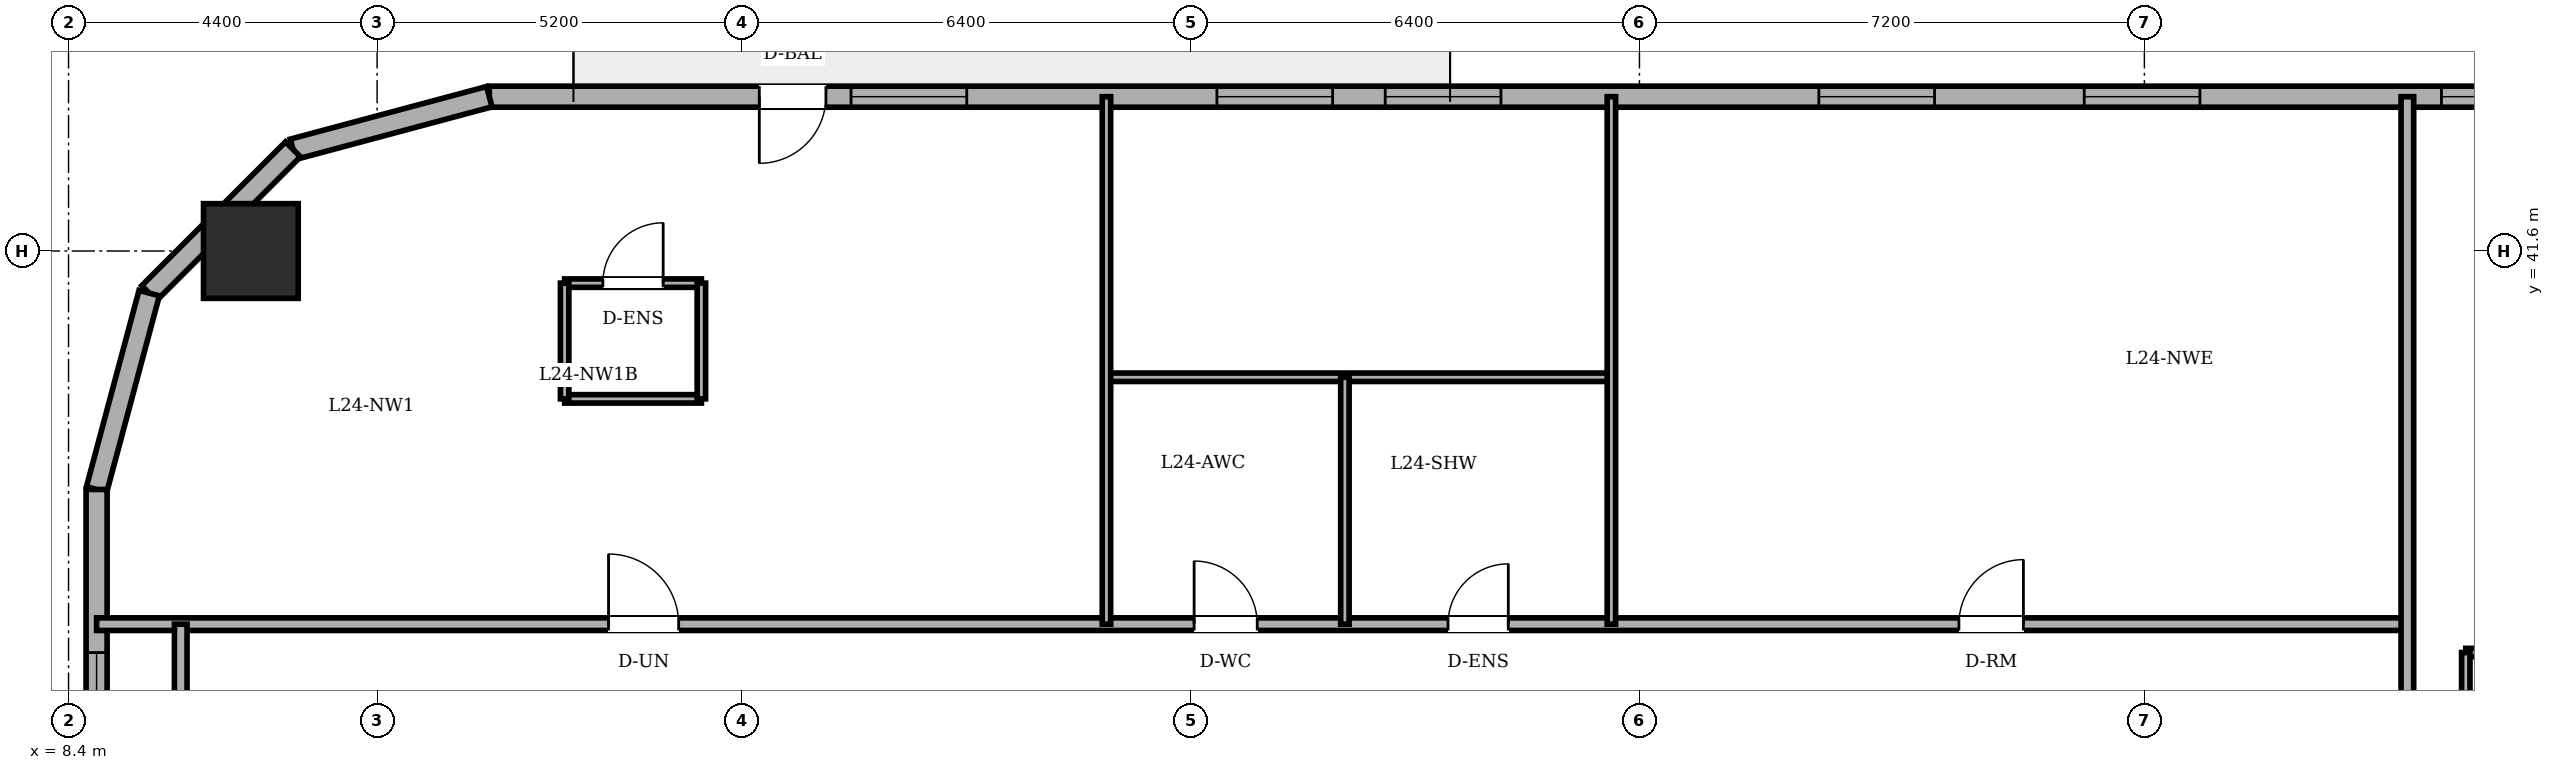
"""IFC4 building model, lengths in metres.
Left out: names, types, materials, properties, quantities, classifications, styles, units other than length and angle.
Written with IfcOpenShell. Run it as: python <this file> out.ifc"""

import sys

from ifc_helpers import new_model, si_unit, direction, frame, frame_2d, origin, origin_2d, place, context, subcontext, project, spatial, rectangle, circle, extrude, element, fill, save


model = new_model("IFC4")
c1 = context("Model", 3, precision=1e-05, world=origin(), true_north=direction((0.0, 1.0)))
c2 = subcontext(c1, "Body", "Model", "MODEL_VIEW")
j1 = project(units=[si_unit("LENGTHUNIT", "METRE"), si_unit("PLANEANGLEUNIT", "RADIAN")], contexts=[c1])
p1 = place(None, origin())
s1 = spatial("IfcSite", under=j1, at=p1, CompositionType="ELEMENT")
p2 = place(p1, origin())
s2 = spatial("IfcBuilding", under=s1, at=p2, CompositionType="ELEMENT")
p3 = place(p2, frame((0.0, 0.0, 93.5)))
s3 = spatial("IfcBuildingStorey", under=s2, at=p3, CompositionType="ELEMENT", Elevation=93.5)
p4 = place(p3, frame((11.0, 41.6, 0.0), z_axis=(0.0, 0.0, 1.0), x_axis=(1.0, 0.0, 0.0)))
e1 = element("IfcColumn", 1, at=p4, inside=s3, PredefinedType="COLUMN", context=c2, shape_type="SweptSolid", body=[
    extrude(circle(Radius=0.675, at=origin_2d()), origin(), (0.0, 0.0, 1.0), 3.6),
])
p5 = place(p3, frame((44.333, 43.8, 0.0), z_axis=(0.0, 0.0, 1.0), x_axis=(-1.0, 0.0, 0.0)))
e2 = element("IfcWall", 2, at=p5, inside=s3, PredefinedType="SOLIDWALL", context=c2, shape_type="SweptSolid", body=[
    extrude(rectangle(XDim=29.933, YDim=0.3, at=frame_2d((14.967, 0.0))), origin(), (0.0, 0.0, 1.0), 3.4),
])
p6 = place(p5, frame((25.133, 0.0, 0.0)))
e3 = element("IfcOpeningElement", 3, at=p6, cuts=e2, PredefinedType="OPENING", context=c2, shape_type="SweptSolid", body=[
    extrude(rectangle(XDim=0.95, YDim=2.2, at=frame_2d((0.475, 1.1))), frame((0.0, 0.16, 0.0), z_axis=(0.0, -1.0, 0.0), x_axis=(1.0, 0.0, 0.0)), (0.0, 0.0, 1.0), 0.32),
])
p7 = place(p5, frame((5.541, 0.0, 0.85)))
e4 = element("IfcOpeningElement", 4, at=p7, cuts=e2, PredefinedType="OPENING", context=c2, shape_type="SweptSolid", body=[
    extrude(rectangle(XDim=1.65, YDim=1.55, at=frame_2d((0.825, 0.775))), frame((0.0, 0.16, 0.0), z_axis=(0.0, -1.0, 0.0), x_axis=(1.0, 0.0, 0.0)), (0.0, 0.0, 1.0), 0.32),
])
p8 = place(p5, frame((9.325, 0.0, 0.85)))
e5 = element("IfcOpeningElement", 5, at=p8, cuts=e2, PredefinedType="OPENING", context=c2, shape_type="SweptSolid", body=[
    extrude(rectangle(XDim=1.65, YDim=1.55, at=frame_2d((0.825, 0.775))), frame((0.0, 0.16, 0.0), z_axis=(0.0, -1.0, 0.0), x_axis=(1.0, 0.0, 0.0)), (0.0, 0.0, 1.0), 0.32),
])
p9 = place(p5, frame((15.508, 0.0, 0.85)))
e6 = element("IfcOpeningElement", 6, at=p9, cuts=e2, PredefinedType="OPENING", context=c2, shape_type="SweptSolid", body=[
    extrude(rectangle(XDim=1.65, YDim=1.55, at=frame_2d((0.825, 0.775))), frame((0.0, 0.16, 0.0), z_axis=(0.0, -1.0, 0.0), x_axis=(1.0, 0.0, 0.0)), (0.0, 0.0, 1.0), 0.32),
])
p10 = place(p5, frame((17.908, 0.0, 0.85)))
e7 = element("IfcOpeningElement", 7, at=p10, cuts=e2, PredefinedType="OPENING", context=c2, shape_type="SweptSolid", body=[
    extrude(rectangle(XDim=1.65, YDim=1.55, at=frame_2d((0.825, 0.775))), frame((0.0, 0.16, 0.0), z_axis=(0.0, -1.0, 0.0), x_axis=(1.0, 0.0, 0.0)), (0.0, 0.0, 1.0), 0.32),
])
p11 = place(p5, frame((23.125, 0.0, 0.85)))
e8 = element("IfcOpeningElement", 8, at=p11, cuts=e2, PredefinedType="OPENING", context=c2, shape_type="SweptSolid", body=[
    extrude(rectangle(XDim=1.65, YDim=1.55, at=frame_2d((0.825, 0.775))), frame((0.0, 0.16, 0.0), z_axis=(0.0, -1.0, 0.0), x_axis=(1.0, 0.0, 0.0)), (0.0, 0.0, 1.0), 0.32),
])
p12 = place(p5, frame((1.047, 0.0, 0.85)))
e9 = element("IfcOpeningElement", 9, at=p12, cuts=e2, PredefinedType="OPENING", context=c2, shape_type="SweptSolid", body=[
    extrude(rectangle(XDim=1.05, YDim=1.55, at=frame_2d((0.525, 0.775))), frame((0.0, 0.16, 0.0), z_axis=(0.0, -1.0, 0.0), x_axis=(1.0, 0.0, 0.0)), (0.0, 0.0, 1.0), 0.32),
])
p13 = place(p3, frame((14.4, 43.8, 0.0), z_axis=(0.0, 0.0, 1.0), x_axis=(-0.965943540406, -0.258752926066, 0.0)))
e10 = element("IfcWall", 10, at=p13, inside=s3, PredefinedType="SOLIDWALL", context=c2, shape_type="SweptSolid", body=[
    extrude(rectangle(XDim=2.898, YDim=0.3, at=frame_2d((1.449, 0.0))), origin(), (0.0, 0.0, 1.0), 3.4),
])
p14 = place(p3, frame((11.6, 43.05, 0.0), z_axis=(0.0, 0.0, 1.0), x_axis=(-0.707106781187, -0.707106781187, 0.0)))
e11 = element("IfcWall", 11, at=p14, inside=s3, PredefinedType="SOLIDWALL", context=c2, shape_type="SweptSolid", body=[
    extrude(rectangle(XDim=2.899, YDim=0.3, at=frame_2d((1.45, 0.0))), origin(), (0.0, 0.0, 1.0), 3.4),
])
p15 = place(p3, frame((9.55, 41.0, 0.0), z_axis=(0.0, 0.0, 1.0), x_axis=(-0.258731875344, -0.96594917914, 0.0)))
e12 = element("IfcWall", 12, at=p15, inside=s3, PredefinedType="SOLIDWALL", context=c2, shape_type="SweptSolid", body=[
    extrude(rectangle(XDim=2.899, YDim=0.3, at=frame_2d((1.449, 0.0))), origin(), (0.0, 0.0, 1.0), 3.4),
])
p16 = place(p3, frame((8.8, 38.2, 0.0), z_axis=(0.0, 0.0, 1.0), x_axis=(0.0, -1.0, 0.0)))
e13 = element("IfcWall", 13, at=p16, inside=s3, PredefinedType="SOLIDWALL", context=c2, shape_type="SweptSolid", body=[
    extrude(rectangle(XDim=28.4, YDim=0.3, at=frame_2d((14.2, 0.0))), origin(), (0.0, 0.0, 1.0), 3.4),
])
p17 = place(p16, frame((2.325, 0.0, 0.85)))
e14 = element("IfcOpeningElement", 14, at=p17, cuts=e13, PredefinedType="OPENING", context=c2, shape_type="SweptSolid", body=[
    extrude(rectangle(XDim=1.65, YDim=1.55, at=frame_2d((0.825, 0.775))), frame((0.0, 0.16, 0.0), z_axis=(0.0, -1.0, 0.0), x_axis=(1.0, 0.0, 0.0)), (0.0, 0.0, 1.0), 0.32),
])
p18 = place(p16, frame((7.328, 0.0, 0.85)))
e15 = element("IfcOpeningElement", 15, at=p18, cuts=e13, PredefinedType="OPENING", context=c2, shape_type="SweptSolid", body=[
    extrude(rectangle(XDim=1.65, YDim=1.55, at=frame_2d((0.825, 0.775))), frame((0.0, 0.16, 0.0), z_axis=(0.0, -1.0, 0.0), x_axis=(1.0, 0.0, 0.0)), (0.0, 0.0, 1.0), 0.32),
])
p19 = place(p16, frame((11.102, 0.0, 0.85)))
e16 = element("IfcOpeningElement", 16, at=p19, cuts=e13, PredefinedType="OPENING", context=c2, shape_type="SweptSolid", body=[
    extrude(rectangle(XDim=1.65, YDim=1.55, at=frame_2d((0.825, 0.775))), frame((0.0, 0.16, 0.0), z_axis=(0.0, -1.0, 0.0), x_axis=(1.0, 0.0, 0.0)), (0.0, 0.0, 1.0), 0.32),
])
p20 = place(p16, frame((17.648, 0.0, 0.85)))
e17 = element("IfcOpeningElement", 17, at=p20, cuts=e13, PredefinedType="OPENING", context=c2, shape_type="SweptSolid", body=[
    extrude(rectangle(XDim=1.65, YDim=1.55, at=frame_2d((0.825, 0.775))), frame((0.0, 0.16, 0.0), z_axis=(0.0, -1.0, 0.0), x_axis=(1.0, 0.0, 0.0)), (0.0, 0.0, 1.0), 0.32),
])
p21 = place(p16, frame((20.422, 0.0, 0.85)))
e18 = element("IfcOpeningElement", 18, at=p21, cuts=e13, PredefinedType="OPENING", context=c2, shape_type="SweptSolid", body=[
    extrude(rectangle(XDim=1.65, YDim=1.55, at=frame_2d((0.825, 0.775))), frame((0.0, 0.16, 0.0), z_axis=(0.0, -1.0, 0.0), x_axis=(1.0, 0.0, 0.0)), (0.0, 0.0, 1.0), 0.32),
])
p22 = place(p16, frame((24.425, 0.0, 0.85)))
e19 = element("IfcOpeningElement", 19, at=p22, cuts=e13, PredefinedType="OPENING", context=c2, shape_type="SweptSolid", body=[
    extrude(rectangle(XDim=1.65, YDim=1.55, at=frame_2d((0.825, 0.775))), frame((0.0, 0.16, 0.0), z_axis=(0.0, -1.0, 0.0), x_axis=(1.0, 0.0, 0.0)), (0.0, 0.0, 1.0), 0.32),
])
p23 = place(p3, frame((42.583, 35.875, 0.0), z_axis=(0.0, 0.0, 1.0), x_axis=(1.0, 0.0, 0.0)))
e20 = element("IfcWall", 20, at=p23, inside=s3, PredefinedType="PARTITIONING", context=c2, shape_type="SweptSolid", body=[
    extrude(rectangle(XDim=1.95, YDim=0.12, at=frame_2d((0.975, 0.0))), origin(), (0.0, 0.0, 1.0), 3.4),
])
p24 = place(p23, frame((0.545, 0.0, 0.0)))
e21 = element("IfcOpeningElement", 21, at=p24, cuts=e20, PredefinedType="OPENING", context=c2, shape_type="SweptSolid", body=[
    extrude(rectangle(XDim=0.86, YDim=2.1, at=frame_2d((0.43, 1.05))), frame((0.0, 0.07, 0.0), z_axis=(0.0, -1.0, 0.0), x_axis=(1.0, 0.0, 0.0)), (0.0, 0.0, 1.0), 0.14),
])
p25 = place(p3, frame((42.583, 35.875, 0.0), z_axis=(0.0, 0.0, 1.0), x_axis=(0.0, -1.0, 0.0)))
e22 = element("IfcWall", 22, at=p25, inside=s3, PredefinedType="PARTITIONING", context=c2, shape_type="SweptSolid", body=[
    extrude(rectangle(XDim=1.65, YDim=0.12, at=frame_2d((0.825, 0.0))), origin(), (0.0, 0.0, 1.0), 3.4),
])
p26 = place(p3, frame((15.474, 41.142, 0.0), z_axis=(0.0, 0.0, 1.0), x_axis=(1.0, 0.0, 0.0)))
e23 = element("IfcWall", 23, at=p26, inside=s3, PredefinedType="PARTITIONING", context=c2, shape_type="SweptSolid", body=[
    extrude(rectangle(XDim=1.95, YDim=0.12, at=frame_2d((0.975, 0.0))), origin(), (0.0, 0.0, 1.0), 3.4),
])
p27 = place(p26, frame((0.545, 0.0, 0.0)))
e24 = element("IfcOpeningElement", 24, at=p27, cuts=e23, PredefinedType="OPENING", context=c2, shape_type="SweptSolid", body=[
    extrude(rectangle(XDim=0.86, YDim=2.1, at=frame_2d((0.43, 1.05))), frame((0.0, 0.07, 0.0), z_axis=(0.0, -1.0, 0.0), x_axis=(1.0, 0.0, 0.0)), (0.0, 0.0, 1.0), 0.14),
])
p28 = place(p3, frame((17.424, 39.492, 0.0), z_axis=(0.0, 0.0, 1.0), x_axis=(-1.0, 0.0, 0.0)))
e25 = element("IfcWall", 25, at=p28, inside=s3, PredefinedType="PARTITIONING", context=c2, shape_type="SweptSolid", body=[
    extrude(rectangle(XDim=1.95, YDim=0.12, at=frame_2d((0.975, 0.0))), origin(), (0.0, 0.0, 1.0), 3.4),
])
for number, where, z_axis, x_axis in (
    (26, (15.474, 41.142, 0.0), (0.0, 0.0, 1.0), (0.0, -1.0, 0.0)),
    (27, (17.424, 39.492, 0.0), (0.0, 0.0, 1.0), (0.0, 1.0, 0.0)),
):
    element("IfcWall", number, at=place(p3, frame(where, z_axis=z_axis, x_axis=x_axis)), inside=s3, PredefinedType="PARTITIONING", context=c2, shape_type="SweptSolid", body=[
        extrude(rectangle(XDim=1.65, YDim=0.12, at=frame_2d((0.825, 0.0))), origin(), (0.0, 0.0, 1.0), 3.4),
    ])
p29 = place(p3, frame((8.8, 36.28, 0.0), z_axis=(0.0, 0.0, 1.0), x_axis=(1.0, 0.0, 0.0)))
e28 = element("IfcWall", 28, at=p29, inside=s3, PredefinedType="PARTITIONING", context=c2, shape_type="SweptSolid", body=[
    extrude(rectangle(XDim=32.95, YDim=0.18, at=frame_2d((16.475, 0.0))), origin(), (0.0, 0.0, 1.0), 3.4),
])
p30 = place(p29, frame((15.65, 0.0, 0.0)))
e29 = element("IfcOpeningElement", 29, at=p30, cuts=e28, PredefinedType="OPENING", context=c2, shape_type="SweptSolid", body=[
    extrude(rectangle(XDim=0.9, YDim=2.1, at=frame_2d((0.45, 1.05))), frame((0.0, 0.1, 0.0), z_axis=(0.0, -1.0, 0.0), x_axis=(1.0, 0.0, 0.0)), (0.0, 0.0, 1.0), 0.2),
])
p31 = place(p29, frame((19.27, 0.0, 0.0)))
e30 = element("IfcOpeningElement", 30, at=p31, cuts=e28, PredefinedType="OPENING", context=c2, shape_type="SweptSolid", body=[
    extrude(rectangle(XDim=0.86, YDim=2.1, at=frame_2d((0.43, 1.05))), frame((0.0, 0.1, 0.0), z_axis=(0.0, -1.0, 0.0), x_axis=(1.0, 0.0, 0.0)), (0.0, 0.0, 1.0), 0.2),
])
p32 = place(p29, frame((7.3, 0.0, 0.0)))
e31 = element("IfcOpeningElement", 31, at=p32, cuts=e28, PredefinedType="OPENING", context=c2, shape_type="SweptSolid", body=[
    extrude(rectangle(XDim=1.0, YDim=2.15, at=frame_2d((0.5, 1.075))), frame((0.0, 0.1, 0.0), z_axis=(0.0, -1.0, 0.0), x_axis=(1.0, 0.0, 0.0)), (0.0, 0.0, 1.0), 0.2),
])
p33 = place(p29, frame((26.555, 0.0, 0.0)))
e32 = element("IfcOpeningElement", 32, at=p33, cuts=e28, PredefinedType="OPENING", context=c2, shape_type="SweptSolid", body=[
    extrude(rectangle(XDim=0.92, YDim=2.1, at=frame_2d((0.46, 1.05))), frame((0.0, 0.1, 0.0), z_axis=(0.0, -1.0, 0.0), x_axis=(1.0, 0.0, 0.0)), (0.0, 0.0, 1.0), 0.2),
])
p34 = place(p3, frame((23.2, 39.8, 0.0), z_axis=(0.0, 0.0, 1.0), x_axis=(1.0, 0.0, 0.0)))
e33 = element("IfcWall", 33, at=p34, inside=s3, PredefinedType="PARTITIONING", context=c2, shape_type="SweptSolid", body=[
    extrude(rectangle(XDim=7.2, YDim=0.12, at=frame_2d((3.6, 0.0))), origin(), (0.0, 0.0, 1.0), 3.4),
])
p35 = place(p3, frame((10.0, 33.82, 0.0), z_axis=(0.0, 0.0, 1.0), x_axis=(0.0, 1.0, 0.0)))
e34 = element("IfcWall", 34, at=p35, inside=s3, PredefinedType="PARTITIONING", context=c2, shape_type="SweptSolid", body=[
    extrude(rectangle(XDim=2.46, YDim=0.18, at=frame_2d((1.23, 0.0))), origin(), (0.0, 0.0, 1.0), 3.4),
])
p36 = place(p3, frame((23.2, 36.28, 0.0), z_axis=(0.0, 0.0, 1.0), x_axis=(0.0, 1.0, 0.0)))
e35 = element("IfcWall", 35, at=p36, inside=s3, PredefinedType="PARTITIONING", context=c2, shape_type="SweptSolid", body=[
    extrude(rectangle(XDim=7.52, YDim=0.12, at=frame_2d((3.76, 0.0))), origin(), (0.0, 0.0, 1.0), 3.4),
])
p37 = place(p3, frame((26.6, 36.28, 0.0), z_axis=(0.0, 0.0, 1.0), x_axis=(0.0, 1.0, 0.0)))
e36 = element("IfcWall", 36, at=p37, inside=s3, PredefinedType="PARTITIONING", context=c2, shape_type="SweptSolid", body=[
    extrude(rectangle(XDim=3.52, YDim=0.12, at=frame_2d((1.76, 0.0))), origin(), (0.0, 0.0, 1.0), 3.4),
])
p38 = place(p3, frame((30.4, 36.28, 0.0), z_axis=(0.0, 0.0, 1.0), x_axis=(0.0, 1.0, 0.0)))
e37 = element("IfcWall", 37, at=p38, inside=s3, PredefinedType="PARTITIONING", context=c2, shape_type="SweptSolid", body=[
    extrude(rectangle(XDim=7.52, YDim=0.12, at=frame_2d((3.76, 0.0))), origin(), (0.0, 0.0, 1.0), 3.4),
])
p39 = place(p3, frame((41.75, 25.18, 0.0), z_axis=(0.0, 0.0, 1.0), x_axis=(0.0, 1.0, 0.0)))
e38 = element("IfcWall", 38, at=p39, inside=s3, PredefinedType="PARTITIONING", context=c2, shape_type="SweptSolid", body=[
    extrude(rectangle(XDim=18.62, YDim=0.18, at=frame_2d((9.31, 0.0))), origin(), (0.0, 0.0, 1.0), 3.4),
])
p40 = place(p39, frame((5.31, 0.0, 0.0)))
e39 = element("IfcOpeningElement", 39, at=p40, cuts=e38, PredefinedType="OPENING", context=c2, shape_type="SweptSolid", body=[
    extrude(rectangle(XDim=1.0, YDim=2.15, at=frame_2d((0.5, 1.075))), frame((0.0, 0.1, 0.0), z_axis=(0.0, -1.0, 0.0), x_axis=(1.0, 0.0, 0.0)), (0.0, 0.0, 1.0), 0.2),
])
p41 = place(p6, origin())
e40 = element("IfcDoor", 40, at=p41, inside=s3, OperationType="SINGLE_SWING_RIGHT", PredefinedType="DOOR", context=c2, shape_type="SweptSolid", body=[
    extrude(rectangle(XDim=0.95, YDim=2.2, at=frame_2d((0.475, 1.1))), frame((0.0, 0.025, 0.0), z_axis=(0.0, -1.0, 0.0), x_axis=(1.0, 0.0, 0.0)), (0.0, 0.0, 1.0), 0.05),
])
fill(e3, e40)
p42 = place(p7, origin())
e41 = element("IfcWindow", 41, at=p42, inside=s3, PartitioningType="DOUBLE_PANEL_VERTICAL", PredefinedType="WINDOW", context=c2, shape_type="SweptSolid", body=[
    extrude(rectangle(XDim=1.65, YDim=1.55, at=frame_2d((0.825, 0.775))), frame((0.0, 0.03, 0.0), z_axis=(0.0, -1.0, 0.0), x_axis=(1.0, 0.0, 0.0)), (0.0, 0.0, 1.0), 0.06),
])
fill(e4, e41)
p43 = place(p8, origin())
e42 = element("IfcWindow", 42, at=p43, inside=s3, PartitioningType="DOUBLE_PANEL_VERTICAL", PredefinedType="WINDOW", context=c2, shape_type="SweptSolid", body=[
    extrude(rectangle(XDim=1.65, YDim=1.55, at=frame_2d((0.825, 0.775))), frame((0.0, 0.03, 0.0), z_axis=(0.0, -1.0, 0.0), x_axis=(1.0, 0.0, 0.0)), (0.0, 0.0, 1.0), 0.06),
])
fill(e5, e42)
p44 = place(p9, origin())
e43 = element("IfcWindow", 43, at=p44, inside=s3, PartitioningType="DOUBLE_PANEL_VERTICAL", PredefinedType="WINDOW", context=c2, shape_type="SweptSolid", body=[
    extrude(rectangle(XDim=1.65, YDim=1.55, at=frame_2d((0.825, 0.775))), frame((0.0, 0.03, 0.0), z_axis=(0.0, -1.0, 0.0), x_axis=(1.0, 0.0, 0.0)), (0.0, 0.0, 1.0), 0.06),
])
fill(e6, e43)
p45 = place(p10, origin())
e44 = element("IfcWindow", 44, at=p45, inside=s3, PartitioningType="DOUBLE_PANEL_VERTICAL", PredefinedType="WINDOW", context=c2, shape_type="SweptSolid", body=[
    extrude(rectangle(XDim=1.65, YDim=1.55, at=frame_2d((0.825, 0.775))), frame((0.0, 0.03, 0.0), z_axis=(0.0, -1.0, 0.0), x_axis=(1.0, 0.0, 0.0)), (0.0, 0.0, 1.0), 0.06),
])
fill(e7, e44)
p46 = place(p11, origin())
e45 = element("IfcWindow", 45, at=p46, inside=s3, PartitioningType="DOUBLE_PANEL_VERTICAL", PredefinedType="WINDOW", context=c2, shape_type="SweptSolid", body=[
    extrude(rectangle(XDim=1.65, YDim=1.55, at=frame_2d((0.825, 0.775))), frame((0.0, 0.03, 0.0), z_axis=(0.0, -1.0, 0.0), x_axis=(1.0, 0.0, 0.0)), (0.0, 0.0, 1.0), 0.06),
])
fill(e8, e45)
p47 = place(p17, origin())
e46 = element("IfcWindow", 46, at=p47, inside=s3, PartitioningType="DOUBLE_PANEL_VERTICAL", PredefinedType="WINDOW", context=c2, shape_type="SweptSolid", body=[
    extrude(rectangle(XDim=1.65, YDim=1.55, at=frame_2d((0.825, 0.775))), frame((0.0, 0.03, 0.0), z_axis=(0.0, -1.0, 0.0), x_axis=(1.0, 0.0, 0.0)), (0.0, 0.0, 1.0), 0.06),
])
fill(e14, e46)
p48 = place(p12, origin())
e47 = element("IfcWindow", 47, at=p48, inside=s3, PartitioningType="SINGLE_PANEL", PredefinedType="WINDOW", context=c2, shape_type="SweptSolid", body=[
    extrude(rectangle(XDim=1.05, YDim=1.55, at=frame_2d((0.525, 0.775))), frame((0.0, 0.03, 0.0), z_axis=(0.0, -1.0, 0.0), x_axis=(1.0, 0.0, 0.0)), (0.0, 0.0, 1.0), 0.06),
])
fill(e9, e47)
p49 = place(p27, origin())
e48 = element("IfcDoor", 48, at=p49, inside=s3, OperationType="SINGLE_SWING_RIGHT", PredefinedType="DOOR", context=c2, shape_type="SweptSolid", body=[
    extrude(rectangle(XDim=0.86, YDim=2.1, at=frame_2d((0.43, 1.05))), frame((0.0, 0.025, 0.0), z_axis=(0.0, -1.0, 0.0), x_axis=(1.0, 0.0, 0.0)), (0.0, 0.0, 1.0), 0.05),
])
fill(e24, e48)
p50 = place(p30, origin())
e49 = element("IfcDoor", 49, at=p50, inside=s3, OperationType="SINGLE_SWING_LEFT", PredefinedType="DOOR", context=c2, shape_type="SweptSolid", body=[
    extrude(rectangle(XDim=0.9, YDim=2.1, at=frame_2d((0.45, 1.05))), frame((0.0, 0.025, 0.0), z_axis=(0.0, -1.0, 0.0), x_axis=(1.0, 0.0, 0.0)), (0.0, 0.0, 1.0), 0.05),
])
fill(e29, e49)
p51 = place(p31, origin())
e50 = element("IfcDoor", 50, at=p51, inside=s3, OperationType="SINGLE_SWING_RIGHT", PredefinedType="DOOR", context=c2, shape_type="SweptSolid", body=[
    extrude(rectangle(XDim=0.86, YDim=2.1, at=frame_2d((0.43, 1.05))), frame((0.0, 0.025, 0.0), z_axis=(0.0, -1.0, 0.0), x_axis=(1.0, 0.0, 0.0)), (0.0, 0.0, 1.0), 0.05),
])
fill(e30, e50)
p52 = place(p32, origin())
e51 = element("IfcDoor", 51, at=p52, inside=s3, OperationType="SINGLE_SWING_LEFT", PredefinedType="DOOR", context=c2, shape_type="SweptSolid", body=[
    extrude(rectangle(XDim=1.0, YDim=2.15, at=frame_2d((0.5, 1.075))), frame((0.0, 0.025, 0.0), z_axis=(0.0, -1.0, 0.0), x_axis=(1.0, 0.0, 0.0)), (0.0, 0.0, 1.0), 0.05),
])
fill(e31, e51)
p53 = place(p33, origin())
e52 = element("IfcDoor", 52, at=p53, inside=s3, OperationType="SINGLE_SWING_RIGHT", PredefinedType="DOOR", context=c2, shape_type="SweptSolid", body=[
    extrude(rectangle(XDim=0.92, YDim=2.1, at=frame_2d((0.46, 1.05))), frame((0.0, 0.025, 0.0), z_axis=(0.0, -1.0, 0.0), x_axis=(1.0, 0.0, 0.0)), (0.0, 0.0, 1.0), 0.05),
])
fill(e32, e52)
save(model, sys.argv[1])
